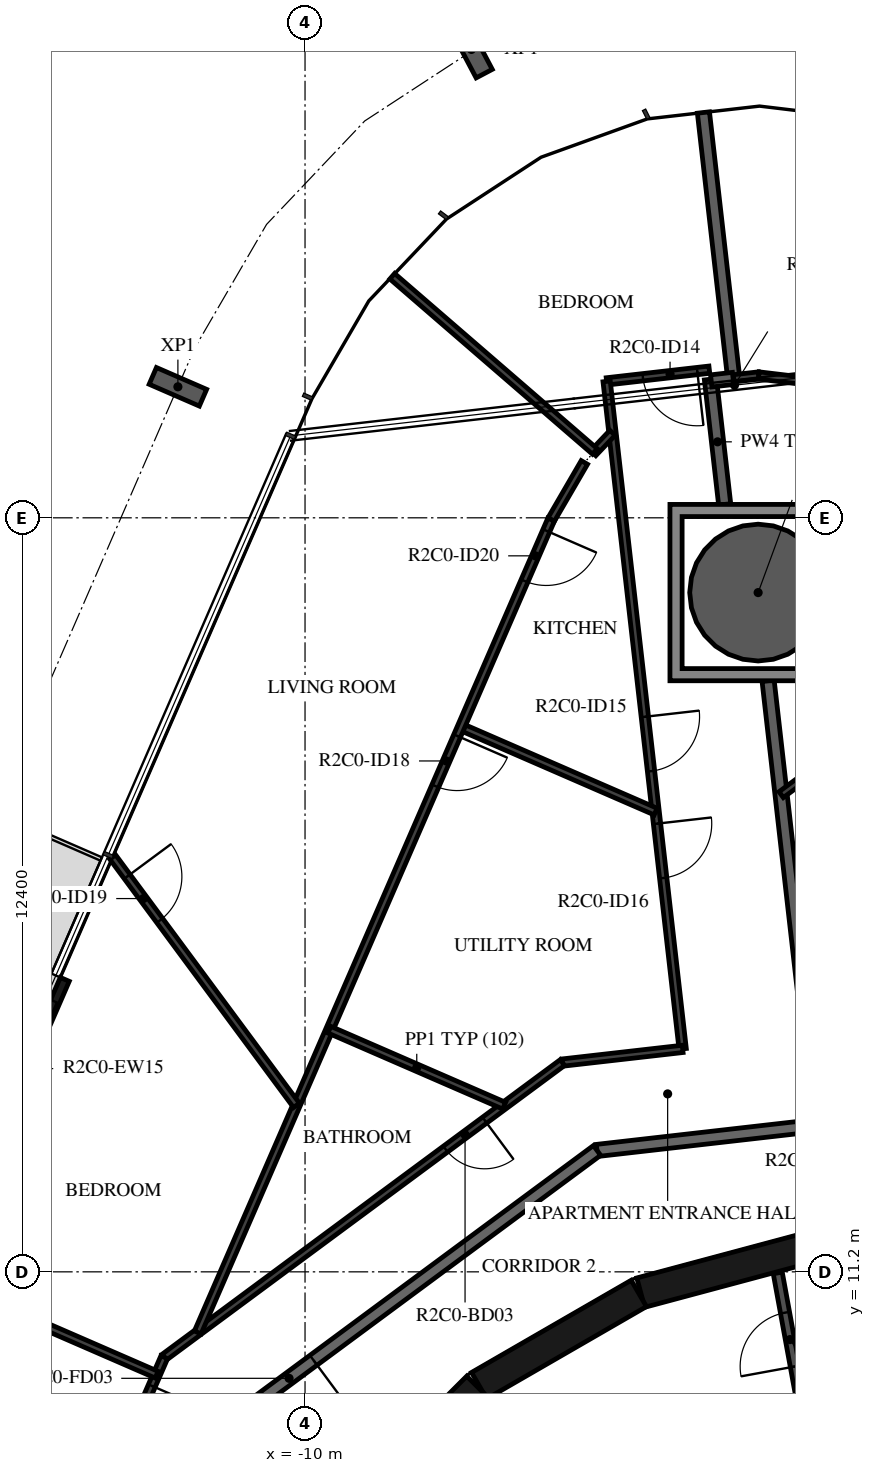
"""IFC4 building model, lengths in metres.
Left out: names, types, materials, properties, quantities, classifications, styles, units other than length and angle.
Written with IfcOpenShell. Run it as: python <this file> out.ifc"""

import sys

from ifc_helpers import new_model, si_unit, direction, frame, frame_2d, origin, origin_2d, place, context, subcontext, project, spatial, polyline, rectangle, hollow_circle, i_section, outline, extrude, element, fill, save


model = new_model("IFC4")
c1 = context("Model", 3, precision=1e-05, world=origin(), true_north=direction((0.0, 1.0)))
c2 = subcontext(c1, "Body", "Model", "MODEL_VIEW")
j1 = project(units=[si_unit("LENGTHUNIT", "METRE"), si_unit("PLANEANGLEUNIT", "RADIAN")], contexts=[c1])
p1 = place(None, origin())
s1 = spatial("IfcSite", under=j1, at=p1, CompositionType="ELEMENT")
p2 = place(p1, origin())
s2 = spatial("IfcBuilding", under=s1, at=p2, CompositionType="ELEMENT")
p3 = place(p2, frame((0.0, 0.0, 104.7)))
s3 = spatial("IfcBuildingStorey", under=s2, at=p3, CompositionType="ELEMENT", Elevation=104.7)
p4 = place(p3, frame((-2.549, 22.37, -0.38), z_axis=(0.0, 0.0, 1.0), x_axis=(1.0, 0.0, 0.0)))
e1 = element("IfcColumn", 1, at=p4, inside=s3, PredefinedType="COLUMN", context=c2, shape_type="SweptSolid", body=[
    extrude(hollow_circle(Radius=1.125, WallThickness=0.055, at=origin_2d()), origin(), (0.0, 0.0, 1.0), 2.576),
])
for number, where, z_axis, x_axis in (
    (2, (-7.263, 31.302, -0.38), (0.0, 0.0, 1.0), (0.884, 0.467, 0.0)),
    (3, (-12.091, 25.754, -0.38), (0.0, 0.0, 1.0), (0.399, 0.917, 0.0)),
):
    element("IfcColumn", number, at=place(p3, frame(where, z_axis=z_axis, x_axis=x_axis)), inside=s3, PredefinedType="COLUMN", context=c2, shape_type="SweptSolid", body=[
        extrude(i_section(OverallWidth=0.3, OverallDepth=0.9, WebThickness=0.019, FlangeThickness=0.035, FilletRadius=0.03, at=origin_2d()), origin(), (0.0, 0.0, 1.0), 2.616),
    ])
p5 = place(p3, frame((-13.951, 16.01, 0.0), z_axis=(0.0, 0.0, 1.0), x_axis=(-0.398720531764, -0.917072482168, 0.0)))
e4 = element("IfcWall", 4, at=p5, inside=s3, PredefinedType="STANDARD", context=c2, shape_type="SweptSolid", body=[
    extrude(rectangle(XDim=3.2, YDim=0.16, at=frame_2d((1.6, 0.0))), origin(), (0.0, 0.0, 1.0), 3.05),
])
p6 = place(p5, frame((0.4, 0.0, 0.0)))
e5 = element("IfcOpeningElement", 5, at=p6, cuts=e4, PredefinedType="OPENING", context=c2, shape_type="SweptSolid", body=[
    extrude(rectangle(XDim=2.4, YDim=2.4, at=frame_2d((1.2, 1.2))), frame((0.0, 0.09, 0.0), z_axis=(0.0, -1.0, 0.0), x_axis=(1.0, 0.0, 0.0)), (0.0, 0.0, 1.0), 0.18),
])
for number, where, z_axis, x_axis in (
    (6, (-1.55, 11.643, 0.0), (0.0, 0.0, 1.0), (-0.966, -0.259, 0.0)),
    (7, (-4.51, 10.845, 0.0), (0.0, 0.0, 1.0), (-0.866, -0.5, 0.0)),
):
    element("IfcWall", number, at=place(p3, frame(where, z_axis=z_axis, x_axis=x_axis)), inside=s3, PredefinedType="SHEAR", context=c2, shape_type="SweptSolid", body=[
        extrude(rectangle(XDim=3.033, YDim=0.5, at=frame_2d((1.516, 0.0))), origin(), (0.0, 0.0, 1.0), 3.05),
    ])
p7 = place(p3, frame((-7.164, 9.308, 0.0), z_axis=(0.0, 0.0, 1.0), x_axis=(-0.707106781187, -0.707106781187, 0.0)))
e8 = element("IfcWall", 8, at=p7, inside=s3, PredefinedType="SHEAR", context=c2, shape_type="SweptSolid", body=[
    extrude(rectangle(XDim=3.032, YDim=0.5, at=frame_2d((1.516, 0.0))), origin(), (0.0, 0.0, 1.0), 3.05),
])
p8 = place(p7, frame((1.416, 0.0, 0.0)))
e9 = element("IfcOpeningElement", 9, at=p8, cuts=e8, PredefinedType="OPENING", context=c2, shape_type="SweptSolid", body=[
    extrude(rectangle(XDim=1.2, YDim=2.1, at=frame_2d((0.6, 1.05))), frame((0.0, 0.26, 0.0), z_axis=(0.0, -1.0, 0.0), x_axis=(1.0, 0.0, 0.0)), (0.0, 0.0, 1.0), 0.52),
])
p9 = place(p3, frame((-1.825, 8.99, 0.0), z_axis=(0.0, 0.0, 1.0), x_axis=(-0.179955206115, 0.983674805915, 0.0)))
e10 = element("IfcWall", 10, at=p9, inside=s3, PredefinedType="PARTITIONING", context=c2, shape_type="SweptSolid", body=[
    extrude(rectangle(XDim=2.229, YDim=0.15, at=frame_2d((1.115, 0.0))), origin(), (0.0, 0.0, 1.0), 3.05),
])
p10 = place(p9, frame((0.665, 0.0, 0.0)))
e11 = element("IfcOpeningElement", 11, at=p10, cuts=e10, PredefinedType="OPENING", context=c2, shape_type="SweptSolid", body=[
    extrude(rectangle(XDim=0.9, YDim=2.1, at=frame_2d((0.45, 1.05))), frame((0.0, 0.085, 0.0), z_axis=(0.0, -1.0, 0.0), x_axis=(1.0, 0.0, 0.0)), (0.0, 0.0, 1.0), 0.17),
])
p11 = place(p3, frame((2.096, 14.028, 0.0), z_axis=(0.0, 0.0, 1.0), x_axis=(-0.993569170114, -0.113226782163, 0.0)))
e12 = element("IfcWall", 12, at=p11, inside=s3, PredefinedType="STANDARD", context=c2, shape_type="SweptSolid", body=[
    extrude(rectangle(XDim=7.342, YDim=0.2, at=frame_2d((3.671, 0.0))), origin(), (0.0, 0.0, 1.0), 3.05),
])
p12 = place(p3, frame((-5.198, 13.196, 0.0), z_axis=(0.0, 0.0, 1.0), x_axis=(-0.803869883159, -0.594805187394, 0.0)))
e13 = element("IfcWall", 13, at=p12, inside=s3, PredefinedType="STANDARD", context=c2, shape_type="SweptSolid", body=[
    extrude(rectangle(XDim=7.342, YDim=0.2, at=frame_2d((3.671, 0.0))), origin(), (0.0, 0.0, 1.0), 3.05),
])
p13 = place(p12, frame((5.8, 0.0, 0.0)))
e14 = element("IfcOpeningElement", 14, at=p13, cuts=e13, PredefinedType="OPENING", context=c2, shape_type="SweptSolid", body=[
    extrude(rectangle(XDim=1.0, YDim=2.1, at=frame_2d((0.5, 1.05))), frame((0.0, 0.11, 0.0), z_axis=(0.0, -1.0, 0.0), x_axis=(1.0, 0.0, 0.0)), (0.0, 0.0, 1.0), 0.22),
])
p14 = place(p3, frame((-2.385, 20.92, 0.0), z_axis=(0.0, 0.0, 1.0), x_axis=(0.113177776247, -0.993574753586, 0.0)))
e15 = element("IfcWall", 15, at=p14, inside=s3, PredefinedType="STANDARD", context=c2, shape_type="SweptSolid", body=[
    extrude(rectangle(XDim=7.356, YDim=0.2, at=frame_2d((3.678, 0.0))), origin(), (0.0, 0.0, 1.0), 3.05),
])
p15 = place(p3, frame((-3.448, 30.265, 0.0), z_axis=(0.0, 0.0, 1.0), x_axis=(0.113189797494, -0.993573384176, 0.0)))
e16 = element("IfcWall", 16, at=p15, inside=s3, PredefinedType="STANDARD", context=c2, shape_type="SweptSolid", body=[
    extrude(rectangle(XDim=4.4, YDim=0.2, at=frame_2d((2.2, 0.0))), origin(), (0.0, 0.0, 1.0), 3.05),
])
p16 = place(p3, frame((-3.333, 25.879, 0.0), z_axis=(0.0, 0.0, 1.0), x_axis=(0.113250782095, -0.993566434797, 0.0)))
e17 = element("IfcWall", 17, at=p16, inside=s3, PredefinedType="STANDARD", context=c2, shape_type="SweptSolid", body=[
    extrude(rectangle(XDim=2.072, YDim=0.2, at=frame_2d((1.036, 0.0))), origin(), (0.0, 0.0, 1.0), 3.05),
])
p17 = place(p3, frame((-2.96, 25.892, 0.0), z_axis=(0.0, 0.0, 1.0), x_axis=(-0.993567388358, -0.113242416041, 0.0)))
e18 = element("IfcWall", 18, at=p17, inside=s3, PredefinedType="STANDARD", context=c2, shape_type="SweptSolid", body=[
    extrude(rectangle(XDim=0.362, YDim=0.2, at=frame_2d((0.181, 0.0))), origin(), (0.0, 0.0, 1.0), 3.05),
])
p18 = place(p3, frame((2.068, 22.183, 0.0), z_axis=(0.0, 0.0, 1.0), x_axis=(-0.803867138365, -0.594808896921, 0.0)))
e19 = element("IfcWall", 19, at=p18, inside=s3, PredefinedType="PARTITIONING", context=c2, shape_type="SweptSolid", body=[
    extrude(rectangle(XDim=5.273, YDim=0.12, at=frame_2d((2.636, 0.0))), origin(), (0.0, 0.0, 1.0), 3.05),
])
p19 = place(p18, frame((0.6, 0.0, 0.0)))
e20 = element("IfcOpeningElement", 20, at=p19, cuts=e19, PredefinedType="OPENING", context=c2, shape_type="SweptSolid", body=[
    extrude(rectangle(XDim=0.9, YDim=2.1, at=frame_2d((0.45, 1.05))), frame((0.0, 0.07, 0.0), z_axis=(0.0, -1.0, 0.0), x_axis=(1.0, 0.0, 0.0)), (0.0, 0.0, 1.0), 0.14),
])
p20 = place(p3, frame((-2.95, 25.893, 0.0), z_axis=(0.0, 0.0, 1.0), x_axis=(0.993519378224, 0.113662857141, 0.0)))
e21 = element("IfcWall", 21, at=p20, inside=s3, PredefinedType="PARTITIONING", context=c2, shape_type="SweptSolid", body=[
    extrude(rectangle(XDim=0.415, YDim=0.12, at=frame_2d((0.207, 0.0))), origin(), (0.0, 0.0, 1.0), 3.05),
])
p21 = place(p3, frame((-2.538, 25.94, 0.0), z_axis=(0.0, 0.0, 1.0), x_axis=(0.992894945409, -0.118994232556, 0.0)))
e22 = element("IfcWall", 22, at=p21, inside=s3, PredefinedType="PARTITIONING", context=c2, shape_type="SweptSolid", body=[
    extrude(rectangle(XDim=0.829, YDim=0.12, at=frame_2d((0.415, 0.0))), origin(), (0.0, 0.0, 1.0), 3.05),
])
p22 = place(p3, frame((-3.351, 26.036, 0.0), z_axis=(0.0, 0.0, 1.0), x_axis=(-0.993575191649, -0.113173930474, 0.0)))
e23 = element("IfcWall", 23, at=p22, inside=s3, PredefinedType="PARTITIONING", context=c2, shape_type="SweptSolid", body=[
    extrude(rectangle(XDim=1.7, YDim=0.12, at=frame_2d((0.85, 0.0))), origin(), (0.0, 0.0, 1.0), 3.05),
])
p23 = place(p22, frame((0.2, 0.0, 0.0)))
e24 = element("IfcOpeningElement", 24, at=p23, cuts=e23, PredefinedType="OPENING", context=c2, shape_type="SweptSolid", body=[
    extrude(rectangle(XDim=0.9, YDim=2.1, at=frame_2d((0.45, 1.05))), frame((0.0, 0.07, 0.0), z_axis=(0.0, -1.0, 0.0), x_axis=(1.0, 0.0, 0.0)), (0.0, 0.0, 1.0), 0.14),
])
p24 = place(p3, frame((-5.04, 25.844, 0.0), z_axis=(0.0, 0.0, 1.0), x_axis=(0.1132106553, -0.993571007793, 0.0)))
e25 = element("IfcWall", 25, at=p24, inside=s3, PredefinedType="PARTITIONING", context=c2, shape_type="SweptSolid", body=[
    extrude(rectangle(XDim=11.048, YDim=0.12, at=frame_2d((5.524, 0.0))), origin(), (0.0, 0.0, 1.0), 3.05),
])
p25 = place(p24, frame((5.551, 0.0, 0.0)))
e26 = element("IfcOpeningElement", 26, at=p25, cuts=e25, PredefinedType="OPENING", context=c2, shape_type="SweptSolid", body=[
    extrude(rectangle(XDim=0.9, YDim=2.1, at=frame_2d((0.45, 1.05))), frame((0.0, 0.07, 0.0), z_axis=(0.0, -1.0, 0.0), x_axis=(1.0, 0.0, 0.0)), (0.0, 0.0, 1.0), 0.14),
])
p26 = place(p24, frame((7.32, 0.0, 0.0)))
e27 = element("IfcOpeningElement", 27, at=p26, cuts=e25, PredefinedType="OPENING", context=c2, shape_type="SweptSolid", body=[
    extrude(rectangle(XDim=0.9, YDim=2.1, at=frame_2d((0.45, 1.05))), frame((0.0, 0.07, 0.0), z_axis=(0.0, -1.0, 0.0), x_axis=(1.0, 0.0, 0.0)), (0.0, 0.0, 1.0), 0.14),
])
p27 = place(p3, frame((-3.79, 14.867, 0.0), z_axis=(0.0, 0.0, 1.0), x_axis=(-0.993557948123, -0.113325212204, 0.0)))
e28 = element("IfcWall", 28, at=p27, inside=s3, PredefinedType="PARTITIONING", context=c2, shape_type="SweptSolid", body=[
    extrude(rectangle(XDim=1.991, YDim=0.12, at=frame_2d((0.995, 0.0))), origin(), (0.0, 0.0, 1.0), 3.05),
])
p28 = place(p3, frame((-5.767, 14.641, 0.0), z_axis=(0.0, 0.0, 1.0), x_axis=(-0.803853364238, -0.594827511807, 0.0)))
e29 = element("IfcWall", 29, at=p28, inside=s3, PredefinedType="PARTITIONING", context=c2, shape_type="SweptSolid", body=[
    extrude(rectangle(XDim=8.146, YDim=0.12, at=frame_2d((4.073, 0.0))), origin(), (0.0, 0.0, 1.0), 3.05),
])
p29 = place(p28, frame((1.592, 0.0, 0.0)))
e30 = element("IfcOpeningElement", 30, at=p29, cuts=e29, PredefinedType="OPENING", context=c2, shape_type="SweptSolid", body=[
    extrude(rectangle(XDim=0.8, YDim=2.1, at=frame_2d((0.4, 1.05))), frame((0.0, 0.07, 0.0), z_axis=(0.0, -1.0, 0.0), x_axis=(1.0, 0.0, 0.0)), (0.0, 0.0, 1.0), 0.14),
])
p30 = place(p3, frame((-12.315, 9.796, 0.0), z_axis=(0.0, 0.0, 1.0), x_axis=(-0.398765150511, -0.917053081745, 0.0)))
e31 = element("IfcWall", 31, at=p30, inside=s3, PredefinedType="PARTITIONING", context=c2, shape_type="SweptSolid", body=[
    extrude(rectangle(XDim=4.573, YDim=0.12, at=frame_2d((2.287, 0.0))), origin(), (0.0, 0.0, 1.0), 3.05),
])
p31 = place(p30, frame((0.513, 0.0, 0.0)))
e32 = element("IfcOpeningElement", 32, at=p31, cuts=e31, PredefinedType="OPENING", context=c2, shape_type="SweptSolid", body=[
    extrude(rectangle(XDim=0.9, YDim=2.1, at=frame_2d((0.45, 1.05))), frame((0.0, 0.07, 0.0), z_axis=(0.0, -1.0, 0.0), x_axis=(1.0, 0.0, 0.0)), (0.0, 0.0, 1.0), 0.14),
])
p32 = place(p3, frame((-5.261, 24.663, 0.0), z_axis=(0.0, 0.0, 1.0), x_axis=(0.688346106747, 0.725382407648, 0.0)))
e33 = element("IfcWall", 33, at=p32, inside=s3, PredefinedType="PARTITIONING", context=c2, shape_type="SweptSolid", body=[
    extrude(rectangle(XDim=0.461, YDim=0.12, at=frame_2d((0.231, 0.0))), origin(), (0.0, 0.0, 1.0), 3.05),
])
p33 = place(p3, frame((-8.566, 27.573, 0.0), z_axis=(0.0, 0.0, 1.0), x_axis=(0.756463964606, -0.654035373854, 0.0)))
e34 = element("IfcWall", 34, at=p33, inside=s3, PredefinedType="PARTITIONING", context=c2, shape_type="SweptSolid", body=[
    extrude(rectangle(XDim=4.405, YDim=0.12, at=frame_2d((2.202, 0.0))), origin(), (0.0, 0.0, 1.0), 3.05),
])
p34 = place(p3, frame((-7.435, 20.161, 0.0), z_axis=(0.0, 0.0, 1.0), x_axis=(0.917055599503, -0.398759360291, 0.0)))
e35 = element("IfcWall", 35, at=p34, inside=s3, PredefinedType="PARTITIONING", context=c2, shape_type="SweptSolid", body=[
    extrude(rectangle(XDim=3.49, YDim=0.12, at=frame_2d((1.745, 0.0))), origin(), (0.0, 0.0, 1.0), 3.05),
])
p35 = place(p3, frame((-5.406, 24.51, 0.0), z_axis=(0.0, 0.0, 1.0), x_axis=(-0.502487709822, -0.864584351858, 0.0)))
e36 = element("IfcWall", 36, at=p35, inside=s3, PredefinedType="PARTITIONING", context=c2, shape_type="SweptSolid", body=[
    extrude(rectangle(XDim=1.087, YDim=0.12, at=frame_2d((0.543, 0.0))), origin(), (0.0, 0.0, 1.0), 3.05),
])
p36 = place(p3, frame((-5.952, 23.571, 0.0), z_axis=(0.0, 0.0, 1.0), x_axis=(-0.398745097158, -0.917061801348, 0.0)))
e37 = element("IfcWall", 37, at=p36, inside=s3, PredefinedType="PARTITIONING", context=c2, shape_type="SweptSolid", body=[
    extrude(rectangle(XDim=14.576, YDim=0.12, at=frame_2d((7.288, 0.0))), origin(), (0.0, 0.0, 1.0), 3.05),
])
p37 = place(p36, frame((3.878, 0.0, 0.0)))
e38 = element("IfcOpeningElement", 38, at=p37, cuts=e37, PredefinedType="OPENING", context=c2, shape_type="SweptSolid", body=[
    extrude(rectangle(XDim=0.9, YDim=2.1, at=frame_2d((0.45, 1.05))), frame((0.0, 0.07, 0.0), z_axis=(0.0, -1.0, 0.0), x_axis=(1.0, 0.0, 0.0)), (0.0, 0.0, 1.0), 0.14),
])
p38 = place(p36, frame((0.2, 0.0, 0.0)))
e39 = element("IfcOpeningElement", 39, at=p38, cuts=e37, PredefinedType="OPENING", context=c2, shape_type="SweptSolid", body=[
    extrude(rectangle(XDim=0.9, YDim=2.1, at=frame_2d((0.45, 1.05))), frame((0.0, 0.07, 0.0), z_axis=(0.0, -1.0, 0.0), x_axis=(1.0, 0.0, 0.0)), (0.0, 0.0, 1.0), 0.14),
])
p39 = place(p3, frame((-9.6, 15.182, 0.0), z_axis=(0.0, 0.0, 1.0), x_axis=(0.917073771145, -0.398717567054, 0.0)))
e40 = element("IfcWall", 40, at=p39, inside=s3, PredefinedType="PARTITIONING", context=c2, shape_type="SweptSolid", body=[
    extrude(rectangle(XDim=3.135, YDim=0.12, at=frame_2d((1.567, 0.0))), origin(), (0.0, 0.0, 1.0), 3.05),
])
p40 = place(p3, frame((-13.163, 18.022, 0.0), z_axis=(0.0, 0.0, 1.0), x_axis=(0.594797671626, -0.803875444226, 0.0)))
e41 = element("IfcWall", 41, at=p40, inside=s3, PredefinedType="PARTITIONING", context=c2, shape_type="SweptSolid", body=[
    extrude(rectangle(XDim=5.081, YDim=0.12, at=frame_2d((2.54, 0.0))), origin(), (0.0, 0.0, 1.0), 3.05),
])
p41 = place(p40, frame((0.4, 0.0, 0.0)))
e42 = element("IfcOpeningElement", 42, at=p41, cuts=e41, PredefinedType="OPENING", context=c2, shape_type="SweptSolid", body=[
    extrude(rectangle(XDim=0.9, YDim=2.1, at=frame_2d((0.45, 1.05))), frame((0.0, 0.07, 0.0), z_axis=(0.0, -1.0, 0.0), x_axis=(1.0, 0.0, 0.0)), (0.0, 0.0, 1.0), 0.14),
])
p42 = place(p3, frame((-16.161, 11.126, 0.0), z_axis=(0.0, 0.0, 1.0), x_axis=(0.91705953326, -0.398750313425, 0.0)))
e43 = element("IfcWall", 43, at=p42, inside=s3, PredefinedType="PARTITIONING", context=c2, shape_type="SweptSolid", body=[
    extrude(rectangle(XDim=4.057, YDim=0.12, at=frame_2d((2.029, 0.0))), origin(), (0.0, 0.0, 1.0), 3.05),
])
p43 = place(p3, origin())
e44 = element("IfcWall", 44, at=p43, inside=s3, PredefinedType="STANDARD", context=c2, shape_type="SweptSolid", body=[
    extrude(outline(polyline([(-1.099, 23.82), (-1.099, 20.92), (-3.999, 20.92), (-3.999, 23.82), (-1.099, 23.82)]), holes=[polyline([(-3.799, 21.12), (-1.299, 21.12), (-1.299, 23.62), (-3.799, 23.62), (-3.799, 21.12)])]), origin(), (0.0, 0.0, 1.0), 3.05),
])
p44 = place(p6, origin())
e45 = element("IfcDoor", 45, at=p44, inside=s3, OperationType="DOUBLE_DOOR_SLIDING", PredefinedType="DOOR", context=c2, shape_type="SweptSolid", body=[
    extrude(rectangle(XDim=2.4, YDim=2.4, at=frame_2d((1.2, 1.2))), frame((0.0, 0.025, 0.0), z_axis=(0.0, -1.0, 0.0), x_axis=(1.0, 0.0, 0.0)), (0.0, 0.0, 1.0), 0.05),
])
fill(e5, e45)
p45 = place(p10, origin())
e46 = element("IfcDoor", 46, at=p45, inside=s3, OperationType="SINGLE_SWING_RIGHT", PredefinedType="DOOR", context=c2, shape_type="SweptSolid", body=[
    extrude(rectangle(XDim=0.9, YDim=2.1, at=frame_2d((0.45, 1.05))), frame((0.0, 0.025, 0.0), z_axis=(0.0, -1.0, 0.0), x_axis=(1.0, 0.0, 0.0)), (0.0, 0.0, 1.0), 0.05),
])
fill(e11, e46)
p46 = place(p13, origin())
e47 = element("IfcDoor", 47, at=p46, inside=s3, OperationType="SINGLE_SWING_LEFT", PredefinedType="DOOR", context=c2, shape_type="SweptSolid", body=[
    extrude(rectangle(XDim=1.0, YDim=2.1, at=frame_2d((0.5, 1.05))), frame((0.0, 0.025, 0.0), z_axis=(0.0, -1.0, 0.0), x_axis=(1.0, 0.0, 0.0)), (0.0, 0.0, 1.0), 0.05),
])
fill(e14, e47)
p47 = place(p23, origin())
e48 = element("IfcDoor", 48, at=p47, inside=s3, OperationType="SINGLE_SWING_RIGHT", PredefinedType="DOOR", context=c2, shape_type="SweptSolid", body=[
    extrude(rectangle(XDim=0.9, YDim=2.1, at=frame_2d((0.45, 1.05))), frame((0.0, 0.025, 0.0), z_axis=(0.0, -1.0, 0.0), x_axis=(1.0, 0.0, 0.0)), (0.0, 0.0, 1.0), 0.05),
])
fill(e24, e48)
p48 = place(p25, origin())
e49 = element("IfcDoor", 49, at=p48, inside=s3, OperationType="SINGLE_SWING_LEFT", PredefinedType="DOOR", context=c2, shape_type="SweptSolid", body=[
    extrude(rectangle(XDim=0.9, YDim=2.1, at=frame_2d((0.45, 1.05))), frame((0.0, 0.025, 0.0), z_axis=(0.0, -1.0, 0.0), x_axis=(1.0, 0.0, 0.0)), (0.0, 0.0, 1.0), 0.05),
])
fill(e26, e49)
p49 = place(p26, origin())
e50 = element("IfcDoor", 50, at=p49, inside=s3, OperationType="SINGLE_SWING_LEFT", PredefinedType="DOOR", context=c2, shape_type="SweptSolid", body=[
    extrude(rectangle(XDim=0.9, YDim=2.1, at=frame_2d((0.45, 1.05))), frame((0.0, 0.025, 0.0), z_axis=(0.0, -1.0, 0.0), x_axis=(1.0, 0.0, 0.0)), (0.0, 0.0, 1.0), 0.05),
])
fill(e27, e50)
p50 = place(p29, origin())
e51 = element("IfcDoor", 51, at=p50, inside=s3, OperationType="SINGLE_SWING_LEFT", PredefinedType="DOOR", context=c2, shape_type="SweptSolid", body=[
    extrude(rectangle(XDim=0.8, YDim=2.1, at=frame_2d((0.4, 1.05))), frame((0.0, 0.025, 0.0), z_axis=(0.0, -1.0, 0.0), x_axis=(1.0, 0.0, 0.0)), (0.0, 0.0, 1.0), 0.05),
])
fill(e30, e51)
p51 = place(p31, origin())
e52 = element("IfcDoor", 52, at=p51, inside=s3, OperationType="SINGLE_SWING_LEFT", PredefinedType="DOOR", context=c2, shape_type="SweptSolid", body=[
    extrude(rectangle(XDim=0.9, YDim=2.1, at=frame_2d((0.45, 1.05))), frame((0.0, 0.025, 0.0), z_axis=(0.0, -1.0, 0.0), x_axis=(1.0, 0.0, 0.0)), (0.0, 0.0, 1.0), 0.05),
])
fill(e32, e52)
p52 = place(p37, origin())
e53 = element("IfcDoor", 53, at=p52, inside=s3, OperationType="SINGLE_SWING_LEFT", PredefinedType="DOOR", context=c2, shape_type="SweptSolid", body=[
    extrude(rectangle(XDim=0.9, YDim=2.1, at=frame_2d((0.45, 1.05))), frame((0.0, 0.025, 0.0), z_axis=(0.0, -1.0, 0.0), x_axis=(1.0, 0.0, 0.0)), (0.0, 0.0, 1.0), 0.05),
])
fill(e38, e53)
p53 = place(p41, origin())
e54 = element("IfcDoor", 54, at=p53, inside=s3, OperationType="SINGLE_SWING_RIGHT", PredefinedType="DOOR", context=c2, shape_type="SweptSolid", body=[
    extrude(rectangle(XDim=0.9, YDim=2.1, at=frame_2d((0.45, 1.05))), frame((0.0, 0.025, 0.0), z_axis=(0.0, -1.0, 0.0), x_axis=(1.0, 0.0, 0.0)), (0.0, 0.0, 1.0), 0.05),
])
fill(e42, e54)
p54 = place(p38, origin())
e55 = element("IfcDoor", 55, at=p54, inside=s3, OperationType="SINGLE_SWING_RIGHT", PredefinedType="DOOR", context=c2, shape_type="SweptSolid", body=[
    extrude(rectangle(XDim=0.9, YDim=2.1, at=frame_2d((0.45, 1.05))), frame((0.0, 0.025, 0.0), z_axis=(0.0, -1.0, 0.0), x_axis=(1.0, 0.0, 0.0)), (0.0, 0.0, 1.0), 0.05),
])
fill(e39, e55)
save(model, sys.argv[1])
